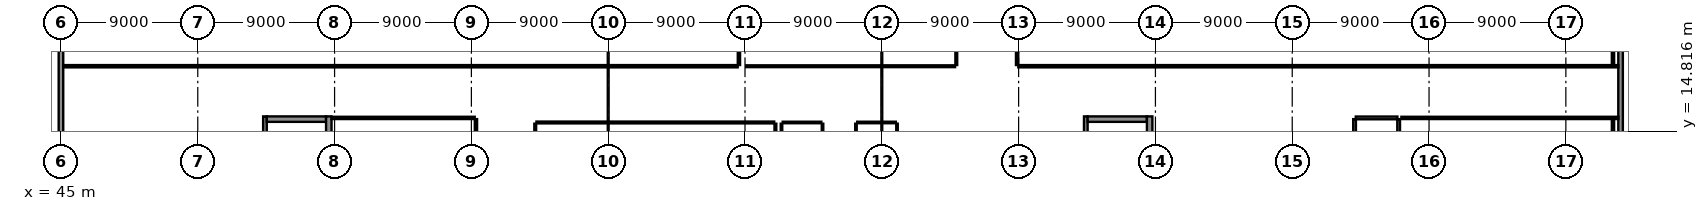
"""IFC4 building model, lengths in metres.
Left out: names, types, materials, properties, quantities, classifications, styles, units other than length and angle.
Written with IfcOpenShell. Run it as: python <this file> out.ifc"""

import sys

from ifc_helpers import new_model, si_unit, direction, frame, frame_2d, origin, place, context, subcontext, project, spatial, rectangle, extrude, element, fill, save


model = new_model("IFC4")
c1 = context("Model", 3, precision=1e-05, world=origin(), true_north=direction((0.0, 1.0)))
c2 = subcontext(c1, "Body", "Model", "MODEL_VIEW")
j1 = project(units=[si_unit("LENGTHUNIT", "METRE"), si_unit("PLANEANGLEUNIT", "RADIAN")], contexts=[c1])
p1 = place(None, origin())
s1 = spatial("IfcSite", under=j1, at=p1, CompositionType="ELEMENT")
p2 = place(p1, origin())
s2 = spatial("IfcBuilding", under=s1, at=p2, CompositionType="ELEMENT")
p3 = place(p2, frame((0.0, 0.0, 18.9)))
s3 = spatial("IfcBuildingStorey", under=s2, at=p3, CompositionType="ELEMENT", Elevation=18.9)
p4 = place(p3, frame((45.0, 23.644, 0.0), z_axis=(0.0, 0.0, 1.0), x_axis=(0.0, -1.0, 0.0)))
e1 = element("IfcWall", 1, at=p4, inside=s3, PredefinedType="SOLIDWALL", context=c2, shape_type="SweptSolid", body=[
    extrude(rectangle(XDim=11.336, YDim=0.3, at=frame_2d((5.668, 0.0))), origin(), (0.0, 0.0, 1.0), 3.705),
])
p5 = place(p4, frame((2.174, 0.0, 0.85)))
e2 = element("IfcOpeningElement", 2, at=p5, cuts=e1, PredefinedType="OPENING", context=c2, shape_type="SweptSolid", body=[
    extrude(rectangle(XDim=2.0, YDim=2.0, at=frame_2d((1.0, 1.0))), frame((0.0, 0.165, 0.0), z_axis=(0.0, -1.0, 0.0), x_axis=(1.0, 0.0, 0.0)), (0.0, 0.0, 1.0), 0.33),
])
p6 = place(p4, frame((5.604, 0.0, 0.85)))
e3 = element("IfcOpeningElement", 3, at=p6, cuts=e1, PredefinedType="OPENING", context=c2, shape_type="SweptSolid", body=[
    extrude(rectangle(XDim=2.0, YDim=2.0, at=frame_2d((1.0, 1.0))), frame((0.0, 0.165, 0.0), z_axis=(0.0, -1.0, 0.0), x_axis=(1.0, 0.0, 0.0)), (0.0, 0.0, 1.0), 0.33),
])
p7 = place(p3, frame((147.6, 11.99, 0.0), z_axis=(0.0, 0.0, 1.0), x_axis=(0.0, 1.0, 0.0)))
e4 = element("IfcWall", 4, at=p7, inside=s3, PredefinedType="SOLIDWALL", context=c2, shape_type="SweptSolid", body=[
    extrude(rectangle(XDim=12.05, YDim=0.3, at=frame_2d((6.025, 0.0))), origin(), (0.0, 0.0, 1.0), 3.555),
])
p8 = place(p7, frame((1.47, 0.0, 0.85)))
e5 = element("IfcOpeningElement", 5, at=p8, cuts=e4, PredefinedType="OPENING", context=c2, shape_type="SweptSolid", body=[
    extrude(rectangle(XDim=2.0, YDim=2.0, at=frame_2d((1.0, 1.0))), frame((0.0, 0.165, 0.0), z_axis=(0.0, -1.0, 0.0), x_axis=(1.0, 0.0, 0.0)), (0.0, 0.0, 1.0), 0.33),
])
p9 = place(p7, frame((7.676, 0.0, 0.85)))
e6 = element("IfcOpeningElement", 6, at=p9, cuts=e4, PredefinedType="OPENING", context=c2, shape_type="SweptSolid", body=[
    extrude(rectangle(XDim=2.0, YDim=2.0, at=frame_2d((1.0, 1.0))), frame((0.0, 0.165, 0.0), z_axis=(0.0, -1.0, 0.0), x_axis=(1.0, 0.0, 0.0)), (0.0, 0.0, 1.0), 0.33),
])
p10 = place(p3, frame((58.42, 13.04, 0.0), z_axis=(0.0, 0.0, 1.0), x_axis=(0.0, 1.0, 0.0)))
e7 = element("IfcWall", 7, at=p10, inside=s3, PredefinedType="SHEAR", context=c2, shape_type="SweptSolid", body=[
    extrude(rectangle(XDim=2.76, YDim=0.24, at=frame_2d((1.38, 0.0))), origin(), (0.0, 0.0, 1.0), 4.16),
])
p11 = place(p3, frame((58.54, 15.62, 0.0), z_axis=(0.0, 0.0, 1.0), x_axis=(1.0, 0.0, 0.0)))
e8 = element("IfcWall", 8, at=p11, inside=s3, PredefinedType="SHEAR", context=c2, shape_type="SweptSolid", body=[
    extrude(rectangle(XDim=3.9, YDim=0.36, at=frame_2d((1.95, 0.0))), origin(), (0.0, 0.0, 1.0), 4.16),
])
p12 = place(p11, frame((1.15, 0.0, 0.0)))
e9 = element("IfcOpeningElement", 9, at=p12, cuts=e8, PredefinedType="OPENING", context=c2, shape_type="SweptSolid", body=[
    extrude(rectangle(XDim=1.6, YDim=2.25, at=frame_2d((0.8, 1.125))), frame((0.0, 0.195, 0.0), z_axis=(0.0, -1.0, 0.0), x_axis=(1.0, 0.0, 0.0)), (0.0, 0.0, 1.0), 0.39),
])
p13 = place(p3, frame((62.62, 6.76, 0.0), z_axis=(0.0, 0.0, 1.0), x_axis=(0.0, 1.0, 0.0)))
e10 = element("IfcWall", 10, at=p13, inside=s3, PredefinedType="SHEAR", context=c2, shape_type="SweptSolid", body=[
    extrude(rectangle(XDim=9.04, YDim=0.36, at=frame_2d((4.52, 0.0))), origin(), (0.0, 0.0, 1.0), 4.16),
])
p14 = place(p3, frame((112.42, 13.04, 0.0), z_axis=(0.0, 0.0, 1.0), x_axis=(0.0, 1.0, 0.0)))
e11 = element("IfcWall", 11, at=p14, inside=s3, PredefinedType="SHEAR", context=c2, shape_type="SweptSolid", body=[
    extrude(rectangle(XDim=2.76, YDim=0.24, at=frame_2d((1.38, 0.0))), origin(), (0.0, 0.0, 1.0), 4.16),
])
p15 = place(p3, frame((112.54, 15.62, 0.0), z_axis=(0.0, 0.0, 1.0), x_axis=(1.0, 0.0, 0.0)))
e12 = element("IfcWall", 12, at=p15, inside=s3, PredefinedType="SHEAR", context=c2, shape_type="SweptSolid", body=[
    extrude(rectangle(XDim=3.9, YDim=0.36, at=frame_2d((1.95, 0.0))), origin(), (0.0, 0.0, 1.0), 4.16),
])
p16 = place(p15, frame((1.15, 0.0, 0.0)))
e13 = element("IfcOpeningElement", 13, at=p16, cuts=e12, PredefinedType="OPENING", context=c2, shape_type="SweptSolid", body=[
    extrude(rectangle(XDim=1.6, YDim=2.25, at=frame_2d((0.8, 1.125))), frame((0.0, 0.195, 0.0), z_axis=(0.0, -1.0, 0.0), x_axis=(1.0, 0.0, 0.0)), (0.0, 0.0, 1.0), 0.39),
])
p17 = place(p3, frame((116.62, 6.76, 0.0), z_axis=(0.0, 0.0, 1.0), x_axis=(0.0, 1.0, 0.0)))
e14 = element("IfcWall", 14, at=p17, inside=s3, PredefinedType="SHEAR", context=c2, shape_type="SweptSolid", body=[
    extrude(rectangle(XDim=9.04, YDim=0.36, at=frame_2d((4.52, 0.0))), origin(), (0.0, 0.0, 1.0), 4.16),
])
p18 = place(p3, frame((89.52, 19.1, 0.0), z_axis=(0.0, 0.0, 1.0), x_axis=(-1.0, 0.0, 0.0)))
e15 = element("IfcWall", 15, at=p18, inside=s3, PredefinedType="PARTITIONING", context=c2, shape_type="SweptSolid", body=[
    extrude(rectangle(XDim=44.375, YDim=0.15, at=frame_2d((22.188, 0.0))), origin(), (0.0, 0.0, 1.0), 4.14),
])
p19 = place(p18, frame((21.663, 0.0, 0.0)))
e16 = element("IfcOpeningElement", 16, at=p19, cuts=e15, PredefinedType="OPENING", context=c2, shape_type="SweptSolid", body=[
    extrude(rectangle(XDim=1.05, YDim=2.25, at=frame_2d((0.525, 1.125))), frame((0.0, 0.09, 0.0), z_axis=(0.0, -1.0, 0.0), x_axis=(1.0, 0.0, 0.0)), (0.0, 0.0, 1.0), 0.18),
])
p20 = place(p3, frame((89.6, 23.677, 0.0), z_axis=(0.0, 0.0, 1.0), x_axis=(0.0, -1.0, 0.0)))
e17 = element("IfcWall", 17, at=p20, inside=s3, PredefinedType="PARTITIONING", context=c2, shape_type="SweptSolid", body=[
    extrude(rectangle(XDim=4.497, YDim=0.15, at=frame_2d((2.249, 0.0))), origin(), (0.0, 0.0, 1.0), 4.14),
])
p21 = place(p3, frame((103.9, 23.855, 0.0), z_axis=(0.0, 0.0, 1.0), x_axis=(0.0, -1.0, 0.0)))
e18 = element("IfcWall", 18, at=p21, inside=s3, PredefinedType="PARTITIONING", context=c2, shape_type="SweptSolid", body=[
    extrude(rectangle(XDim=4.675, YDim=0.12, at=frame_2d((2.337, 0.0))), origin(), (0.0, 0.0, 1.0), 4.14),
])
p22 = place(p3, frame((103.82, 19.1, 0.0), z_axis=(0.0, 0.0, 1.0), x_axis=(-1.0, 0.0, 0.0)))
e19 = element("IfcWall", 19, at=p22, inside=s3, PredefinedType="PARTITIONING", context=c2, shape_type="SweptSolid", body=[
    extrude(rectangle(XDim=13.74, YDim=0.12, at=frame_2d((6.87, 0.0))), origin(), (0.0, 0.0, 1.0), 4.14),
])
p23 = place(p22, frame((6.395, 0.0, 0.0)))
e20 = element("IfcOpeningElement", 20, at=p23, cuts=e19, PredefinedType="OPENING", context=c2, shape_type="SweptSolid", body=[
    extrude(rectangle(XDim=0.95, YDim=2.15, at=frame_2d((0.475, 1.075))), frame((0.0, 0.075, 0.0), z_axis=(0.0, -1.0, 0.0), x_axis=(1.0, 0.0, 0.0)), (0.0, 0.0, 1.0), 0.15),
])
p24 = place(p3, frame((147.1, 23.855, 0.0), z_axis=(0.0, 0.0, 1.0), x_axis=(0.0, -1.0, 0.0)))
e21 = element("IfcWall", 21, at=p24, inside=s3, PredefinedType="PARTITIONING", context=c2, shape_type="SweptSolid", body=[
    extrude(rectangle(XDim=4.675, YDim=0.15, at=frame_2d((2.337, 0.0))), origin(), (0.0, 0.0, 1.0), 4.14),
])
p25 = place(p3, frame((147.455, 19.1, 0.0), z_axis=(0.0, 0.0, 1.0), x_axis=(-1.0, 0.0, 0.0)))
e22 = element("IfcWall", 22, at=p25, inside=s3, PredefinedType="PARTITIONING", context=c2, shape_type="SweptSolid", body=[
    extrude(rectangle(XDim=39.475, YDim=0.15, at=frame_2d((19.738, 0.0))), origin(), (0.0, 0.0, 1.0), 4.14),
])
p26 = place(p25, frame((19.213, 0.0, 0.0)))
e23 = element("IfcOpeningElement", 23, at=p26, cuts=e22, PredefinedType="OPENING", context=c2, shape_type="SweptSolid", body=[
    extrude(rectangle(XDim=1.05, YDim=2.25, at=frame_2d((0.525, 1.125))), frame((0.0, 0.09, 0.0), z_axis=(0.0, -1.0, 0.0), x_axis=(1.0, 0.0, 0.0)), (0.0, 0.0, 1.0), 0.18),
])
p27 = place(p3, frame((107.9, 19.18, 0.0), z_axis=(0.0, 0.0, 1.0), x_axis=(0.0, 1.0, 0.0)))
e24 = element("IfcWall", 24, at=p27, inside=s3, PredefinedType="PARTITIONING", context=c2, shape_type="SweptSolid", body=[
    extrude(rectangle(XDim=4.522, YDim=0.15, at=frame_2d((2.261, 0.0))), origin(), (0.0, 0.0, 1.0), 3.655),
])
p28 = place(p3, frame((62.795, 15.7, 0.0), z_axis=(0.0, 0.0, 1.0), x_axis=(1.0, 0.0, 0.0)))
e25 = element("IfcWall", 25, at=p28, inside=s3, PredefinedType="PARTITIONING", context=c2, shape_type="SweptSolid", body=[
    extrude(rectangle(XDim=9.425, YDim=0.15, at=frame_2d((4.712, 0.0))), origin(), (0.0, 0.0, 1.0), 4.14),
])
p29 = place(p28, frame((4.187, 0.0, 0.0)))
e26 = element("IfcOpeningElement", 26, at=p29, cuts=e25, PredefinedType="OPENING", context=c2, shape_type="SweptSolid", body=[
    extrude(rectangle(XDim=1.05, YDim=2.25, at=frame_2d((0.525, 1.125))), frame((0.0, 0.09, 0.0), z_axis=(0.0, -1.0, 0.0), x_axis=(1.0, 0.0, 0.0)), (0.0, 0.0, 1.0), 0.18),
])
p30 = place(p3, frame((72.3, 15.62, 0.0), z_axis=(0.0, 0.0, 1.0), x_axis=(0.0, -1.0, 0.0)))
e27 = element("IfcWall", 27, at=p30, inside=s3, PredefinedType="PARTITIONING", context=c2, shape_type="SweptSolid", body=[
    extrude(rectangle(XDim=3.04, YDim=0.15, at=frame_2d((1.52, 0.0))), origin(), (0.0, 0.0, 1.0), 4.14),
])
p31 = place(p3, frame((76.2, 3.655, 0.0), z_axis=(0.0, 0.0, 1.0), x_axis=(0.0, 1.0, 0.0)))
e28 = element("IfcWall", 28, at=p31, inside=s3, PredefinedType="PARTITIONING", context=c2, shape_type="SweptSolid", body=[
    extrude(rectangle(XDim=11.665, YDim=0.12, at=frame_2d((5.833, 0.0))), origin(), (0.0, 0.0, 1.0), 4.14),
])
p32 = place(p3, frame((76.28, 15.4, 0.0), z_axis=(0.0, 0.0, 1.0), x_axis=(1.0, 0.0, 0.0)))
e29 = element("IfcWall", 29, at=p32, inside=s3, PredefinedType="PARTITIONING", context=c2, shape_type="SweptSolid", body=[
    extrude(rectangle(XDim=15.64, YDim=0.12, at=frame_2d((7.82, 0.0))), origin(), (0.0, 0.0, 1.0), 4.14),
])
p33 = place(p32, frame((7.345, 0.0, 0.0)))
e30 = element("IfcOpeningElement", 30, at=p33, cuts=e29, PredefinedType="OPENING", context=c2, shape_type="SweptSolid", body=[
    extrude(rectangle(XDim=0.95, YDim=2.15, at=frame_2d((0.475, 1.075))), frame((0.0, 0.075, 0.0), z_axis=(0.0, -1.0, 0.0), x_axis=(1.0, 0.0, 0.0)), (0.0, 0.0, 1.0), 0.15),
])
p34 = place(p3, frame((92.0, 15.32, 0.0), z_axis=(0.0, 0.0, 1.0), x_axis=(0.0, -1.0, 0.0)))
e31 = element("IfcWall", 31, at=p34, inside=s3, PredefinedType="PARTITIONING", context=c2, shape_type="SweptSolid", body=[
    extrude(rectangle(XDim=11.665, YDim=0.12, at=frame_2d((5.833, 0.0))), origin(), (0.0, 0.0, 1.0), 4.14),
])
p35 = place(p3, frame((130.1, 11.68, 0.0), z_axis=(0.0, 0.0, 1.0), x_axis=(0.0, 1.0, 0.0)))
e32 = element("IfcWall", 32, at=p35, inside=s3, PredefinedType="PARTITIONING", context=c2, shape_type="SweptSolid", body=[
    extrude(rectangle(XDim=3.94, YDim=0.18, at=frame_2d((1.97, 0.0))), origin(), (0.0, 0.0, 1.0), 4.14),
])
p36 = place(p35, frame((1.395, 0.0, 0.0)))
e33 = element("IfcOpeningElement", 33, at=p36, cuts=e32, PredefinedType="OPENING", context=c2, shape_type="SweptSolid", body=[
    extrude(rectangle(XDim=1.15, YDim=2.15, at=frame_2d((0.575, 1.075))), frame((0.0, 0.105, 0.0), z_axis=(0.0, -1.0, 0.0), x_axis=(1.0, 0.0, 0.0)), (0.0, 0.0, 1.0), 0.21),
])
p37 = place(p3, frame((130.18, 15.7, 0.0), z_axis=(0.0, 0.0, 1.0), x_axis=(1.0, 0.0, 0.0)))
e34 = element("IfcWall", 34, at=p37, inside=s3, PredefinedType="PARTITIONING", context=c2, shape_type="SweptSolid", body=[
    extrude(rectangle(XDim=2.74, YDim=0.18, at=frame_2d((1.37, 0.0))), origin(), (0.0, 0.0, 1.0), 4.14),
])
p38 = place(p3, frame((133.0, 15.62, 0.0), z_axis=(0.0, 0.0, 1.0), x_axis=(0.0, -1.0, 0.0)))
e35 = element("IfcWall", 35, at=p38, inside=s3, PredefinedType="PARTITIONING", context=c2, shape_type="SweptSolid", body=[
    extrude(rectangle(XDim=3.94, YDim=0.18, at=frame_2d((1.97, 0.0))), origin(), (0.0, 0.0, 1.0), 4.14),
])
p39 = place(p3, frame((133.18, 15.7, 0.0), z_axis=(0.0, 0.0, 1.0), x_axis=(1.0, 0.0, 0.0)))
e36 = element("IfcWall", 36, at=p39, inside=s3, PredefinedType="PARTITIONING", context=c2, shape_type="SweptSolid", body=[
    extrude(rectangle(XDim=14.275, YDim=0.15, at=frame_2d((7.138, 0.0))), origin(), (0.0, 0.0, 1.0), 4.14),
])
p40 = place(p39, frame((6.612, 0.0, 0.0)))
e37 = element("IfcOpeningElement", 37, at=p40, cuts=e36, PredefinedType="OPENING", context=c2, shape_type="SweptSolid", body=[
    extrude(rectangle(XDim=1.05, YDim=2.25, at=frame_2d((0.525, 1.125))), frame((0.0, 0.09, 0.0), z_axis=(0.0, -1.0, 0.0), x_axis=(1.0, 0.0, 0.0)), (0.0, 0.0, 1.0), 0.18),
])
p41 = place(p3, frame((147.1, 15.63, 0.0), z_axis=(0.0, 0.0, 1.0), x_axis=(0.0, -1.0, 0.0)))
e38 = element("IfcWall", 38, at=p41, inside=s3, PredefinedType="PARTITIONING", context=c2, shape_type="SweptSolid", body=[
    extrude(rectangle(XDim=15.485, YDim=0.15, at=frame_2d((7.742, 0.0))), origin(), (0.0, 0.0, 1.0), 4.14),
])
p42 = place(p3, frame((95.1, 15.32, 0.0), z_axis=(0.0, 0.0, 1.0), x_axis=(0.0, -1.0, 0.0)))
e39 = element("IfcWall", 39, at=p42, inside=s3, PredefinedType="PARTITIONING", context=c2, shape_type="SweptSolid", body=[
    extrude(rectangle(XDim=5.34, YDim=0.1, at=frame_2d((2.67, 0.0))), origin(), (0.0, 0.0, 1.0), 4.14),
])
p43 = place(p42, frame((2.22, 0.0, 0.0)))
e40 = element("IfcOpeningElement", 40, at=p43, cuts=e39, PredefinedType="OPENING", context=c2, shape_type="SweptSolid", body=[
    extrude(rectangle(XDim=0.9, YDim=2.05, at=frame_2d((0.45, 1.025))), frame((0.0, 0.065, 0.0), z_axis=(0.0, -1.0, 0.0), x_axis=(1.0, 0.0, 0.0)), (0.0, 0.0, 1.0), 0.13),
])
p44 = place(p3, frame((92.4, 9.845, 0.0), z_axis=(0.0, 0.0, 1.0), x_axis=(0.0, 1.0, 0.0)))
e41 = element("IfcWall", 41, at=p44, inside=s3, PredefinedType="PARTITIONING", context=c2, shape_type="SweptSolid", body=[
    extrude(rectangle(XDim=5.475, YDim=0.1, at=frame_2d((2.738, 0.0))), origin(), (0.0, 0.0, 1.0), 4.14),
])
p45 = place(p3, frame((92.48, 15.4, 0.0), z_axis=(0.0, 0.0, 1.0), x_axis=(1.0, 0.0, 0.0)))
e42 = element("IfcWall", 42, at=p45, inside=s3, PredefinedType="PARTITIONING", context=c2, shape_type="SweptSolid", body=[
    extrude(rectangle(XDim=2.54, YDim=0.1, at=frame_2d((1.27, 0.0))), origin(), (0.0, 0.0, 1.0), 4.14),
])
p46 = place(p3, frame((97.3, 9.88, 0.0), z_axis=(0.0, 0.0, 1.0), x_axis=(0.0, 1.0, 0.0)))
e43 = element("IfcWall", 43, at=p46, inside=s3, PredefinedType="PARTITIONING", context=c2, shape_type="SweptSolid", body=[
    extrude(rectangle(XDim=5.44, YDim=0.1, at=frame_2d((2.72, 0.0))), origin(), (0.0, 0.0, 1.0), 4.14),
])
p47 = place(p46, frame((2.22, 0.0, 0.0)))
e44 = element("IfcOpeningElement", 44, at=p47, cuts=e43, PredefinedType="OPENING", context=c2, shape_type="SweptSolid", body=[
    extrude(rectangle(XDim=1.0, YDim=2.1, at=frame_2d((0.5, 1.05))), frame((0.0, 0.065, 0.0), z_axis=(0.0, -1.0, 0.0), x_axis=(1.0, 0.0, 0.0)), (0.0, 0.0, 1.0), 0.13),
])
p48 = place(p3, frame((97.38, 15.4, 0.0), z_axis=(0.0, 0.0, 1.0), x_axis=(1.0, 0.0, 0.0)))
e45 = element("IfcWall", 45, at=p48, inside=s3, PredefinedType="PARTITIONING", context=c2, shape_type="SweptSolid", body=[
    extrude(rectangle(XDim=2.54, YDim=0.1, at=frame_2d((1.27, 0.0))), origin(), (0.0, 0.0, 1.0), 4.14),
])
p49 = place(p3, frame((100.0, 15.32, 0.0), z_axis=(0.0, 0.0, 1.0), x_axis=(0.0, -1.0, 0.0)))
e46 = element("IfcWall", 46, at=p49, inside=s3, PredefinedType="PARTITIONING", context=c2, shape_type="SweptSolid", body=[
    extrude(rectangle(XDim=5.44, YDim=0.1, at=frame_2d((2.72, 0.0))), origin(), (0.0, 0.0, 1.0), 4.14),
])
p50 = place(p5, origin())
e47 = element("IfcWindow", 47, at=p50, inside=s3, PartitioningType="SINGLE_PANEL", PredefinedType="WINDOW", context=c2, shape_type="SweptSolid", body=[
    extrude(rectangle(XDim=2.0, YDim=2.0, at=frame_2d((1.0, 1.0))), frame((0.0, 0.03, 0.0), z_axis=(0.0, -1.0, 0.0), x_axis=(1.0, 0.0, 0.0)), (0.0, 0.0, 1.0), 0.06),
])
fill(e2, e47)
p51 = place(p6, origin())
e48 = element("IfcWindow", 48, at=p51, inside=s3, PartitioningType="SINGLE_PANEL", PredefinedType="WINDOW", context=c2, shape_type="SweptSolid", body=[
    extrude(rectangle(XDim=2.0, YDim=2.0, at=frame_2d((1.0, 1.0))), frame((0.0, 0.03, 0.0), z_axis=(0.0, -1.0, 0.0), x_axis=(1.0, 0.0, 0.0)), (0.0, 0.0, 1.0), 0.06),
])
fill(e3, e48)
p52 = place(p8, origin())
e49 = element("IfcWindow", 49, at=p52, inside=s3, PartitioningType="SINGLE_PANEL", PredefinedType="WINDOW", context=c2, shape_type="SweptSolid", body=[
    extrude(rectangle(XDim=2.0, YDim=2.0, at=frame_2d((1.0, 1.0))), frame((0.0, 0.03, 0.0), z_axis=(0.0, -1.0, 0.0), x_axis=(1.0, 0.0, 0.0)), (0.0, 0.0, 1.0), 0.06),
])
fill(e5, e49)
p53 = place(p9, origin())
e50 = element("IfcWindow", 50, at=p53, inside=s3, PartitioningType="SINGLE_PANEL", PredefinedType="WINDOW", context=c2, shape_type="SweptSolid", body=[
    extrude(rectangle(XDim=2.0, YDim=2.0, at=frame_2d((1.0, 1.0))), frame((0.0, 0.03, 0.0), z_axis=(0.0, -1.0, 0.0), x_axis=(1.0, 0.0, 0.0)), (0.0, 0.0, 1.0), 0.06),
])
fill(e6, e50)
p54 = place(p12, origin())
e51 = element("IfcDoor", 51, at=p54, inside=s3, OperationType="DOUBLE_DOOR_SINGLE_SWING", PredefinedType="DOOR", context=c2, shape_type="SweptSolid", body=[
    extrude(rectangle(XDim=1.6, YDim=2.25, at=frame_2d((0.8, 1.125))), frame((0.0, 0.025, 0.0), z_axis=(0.0, -1.0, 0.0), x_axis=(1.0, 0.0, 0.0)), (0.0, 0.0, 1.0), 0.05),
])
fill(e9, e51)
p55 = place(p16, origin())
e52 = element("IfcDoor", 52, at=p55, inside=s3, OperationType="DOUBLE_DOOR_SINGLE_SWING", PredefinedType="DOOR", context=c2, shape_type="SweptSolid", body=[
    extrude(rectangle(XDim=1.6, YDim=2.25, at=frame_2d((0.8, 1.125))), frame((0.0, 0.025, 0.0), z_axis=(0.0, -1.0, 0.0), x_axis=(1.0, 0.0, 0.0)), (0.0, 0.0, 1.0), 0.05),
])
fill(e13, e52)
p56 = place(p19, frame((1.05, 0.0, 0.0), z_axis=(0.0, 0.0, 1.0), x_axis=(-1.0, 0.0, 0.0)))
e53 = element("IfcDoor", 53, at=p56, inside=s3, OperationType="SINGLE_SWING_RIGHT", PredefinedType="DOOR", context=c2, shape_type="SweptSolid", body=[
    extrude(rectangle(XDim=1.05, YDim=2.25, at=frame_2d((0.525, 1.125))), frame((0.0, 0.025, 0.0), z_axis=(0.0, -1.0, 0.0), x_axis=(1.0, 0.0, 0.0)), (0.0, 0.0, 1.0), 0.05),
])
fill(e16, e53)
p57 = place(p23, origin())
e54 = element("IfcDoor", 54, at=p57, inside=s3, OperationType="SINGLE_SWING_LEFT", PredefinedType="DOOR", context=c2, shape_type="SweptSolid", body=[
    extrude(rectangle(XDim=0.95, YDim=2.15, at=frame_2d((0.475, 1.075))), frame((0.0, 0.025, 0.0), z_axis=(0.0, -1.0, 0.0), x_axis=(1.0, 0.0, 0.0)), (0.0, 0.0, 1.0), 0.05),
])
fill(e20, e54)
p58 = place(p26, frame((1.05, 0.0, 0.0), z_axis=(0.0, 0.0, 1.0), x_axis=(-1.0, 0.0, 0.0)))
e55 = element("IfcDoor", 55, at=p58, inside=s3, OperationType="SINGLE_SWING_RIGHT", PredefinedType="DOOR", context=c2, shape_type="SweptSolid", body=[
    extrude(rectangle(XDim=1.05, YDim=2.25, at=frame_2d((0.525, 1.125))), frame((0.0, 0.025, 0.0), z_axis=(0.0, -1.0, 0.0), x_axis=(1.0, 0.0, 0.0)), (0.0, 0.0, 1.0), 0.05),
])
fill(e23, e55)
p59 = place(p29, frame((1.05, 0.0, 0.0), z_axis=(0.0, 0.0, 1.0), x_axis=(-1.0, 0.0, 0.0)))
e56 = element("IfcDoor", 56, at=p59, inside=s3, OperationType="SINGLE_SWING_RIGHT", PredefinedType="DOOR", context=c2, shape_type="SweptSolid", body=[
    extrude(rectangle(XDim=1.05, YDim=2.25, at=frame_2d((0.525, 1.125))), frame((0.0, 0.025, 0.0), z_axis=(0.0, -1.0, 0.0), x_axis=(1.0, 0.0, 0.0)), (0.0, 0.0, 1.0), 0.05),
])
fill(e26, e56)
p60 = place(p33, origin())
e57 = element("IfcDoor", 57, at=p60, inside=s3, OperationType="SINGLE_SWING_LEFT", PredefinedType="DOOR", context=c2, shape_type="SweptSolid", body=[
    extrude(rectangle(XDim=0.95, YDim=2.15, at=frame_2d((0.475, 1.075))), frame((0.0, 0.025, 0.0), z_axis=(0.0, -1.0, 0.0), x_axis=(1.0, 0.0, 0.0)), (0.0, 0.0, 1.0), 0.05),
])
fill(e30, e57)
p61 = place(p40, frame((1.05, 0.0, 0.0), z_axis=(0.0, 0.0, 1.0), x_axis=(-1.0, 0.0, 0.0)))
e58 = element("IfcDoor", 58, at=p61, inside=s3, OperationType="SINGLE_SWING_RIGHT", PredefinedType="DOOR", context=c2, shape_type="SweptSolid", body=[
    extrude(rectangle(XDim=1.05, YDim=2.25, at=frame_2d((0.525, 1.125))), frame((0.0, 0.025, 0.0), z_axis=(0.0, -1.0, 0.0), x_axis=(1.0, 0.0, 0.0)), (0.0, 0.0, 1.0), 0.05),
])
fill(e37, e58)
save(model, sys.argv[1])
